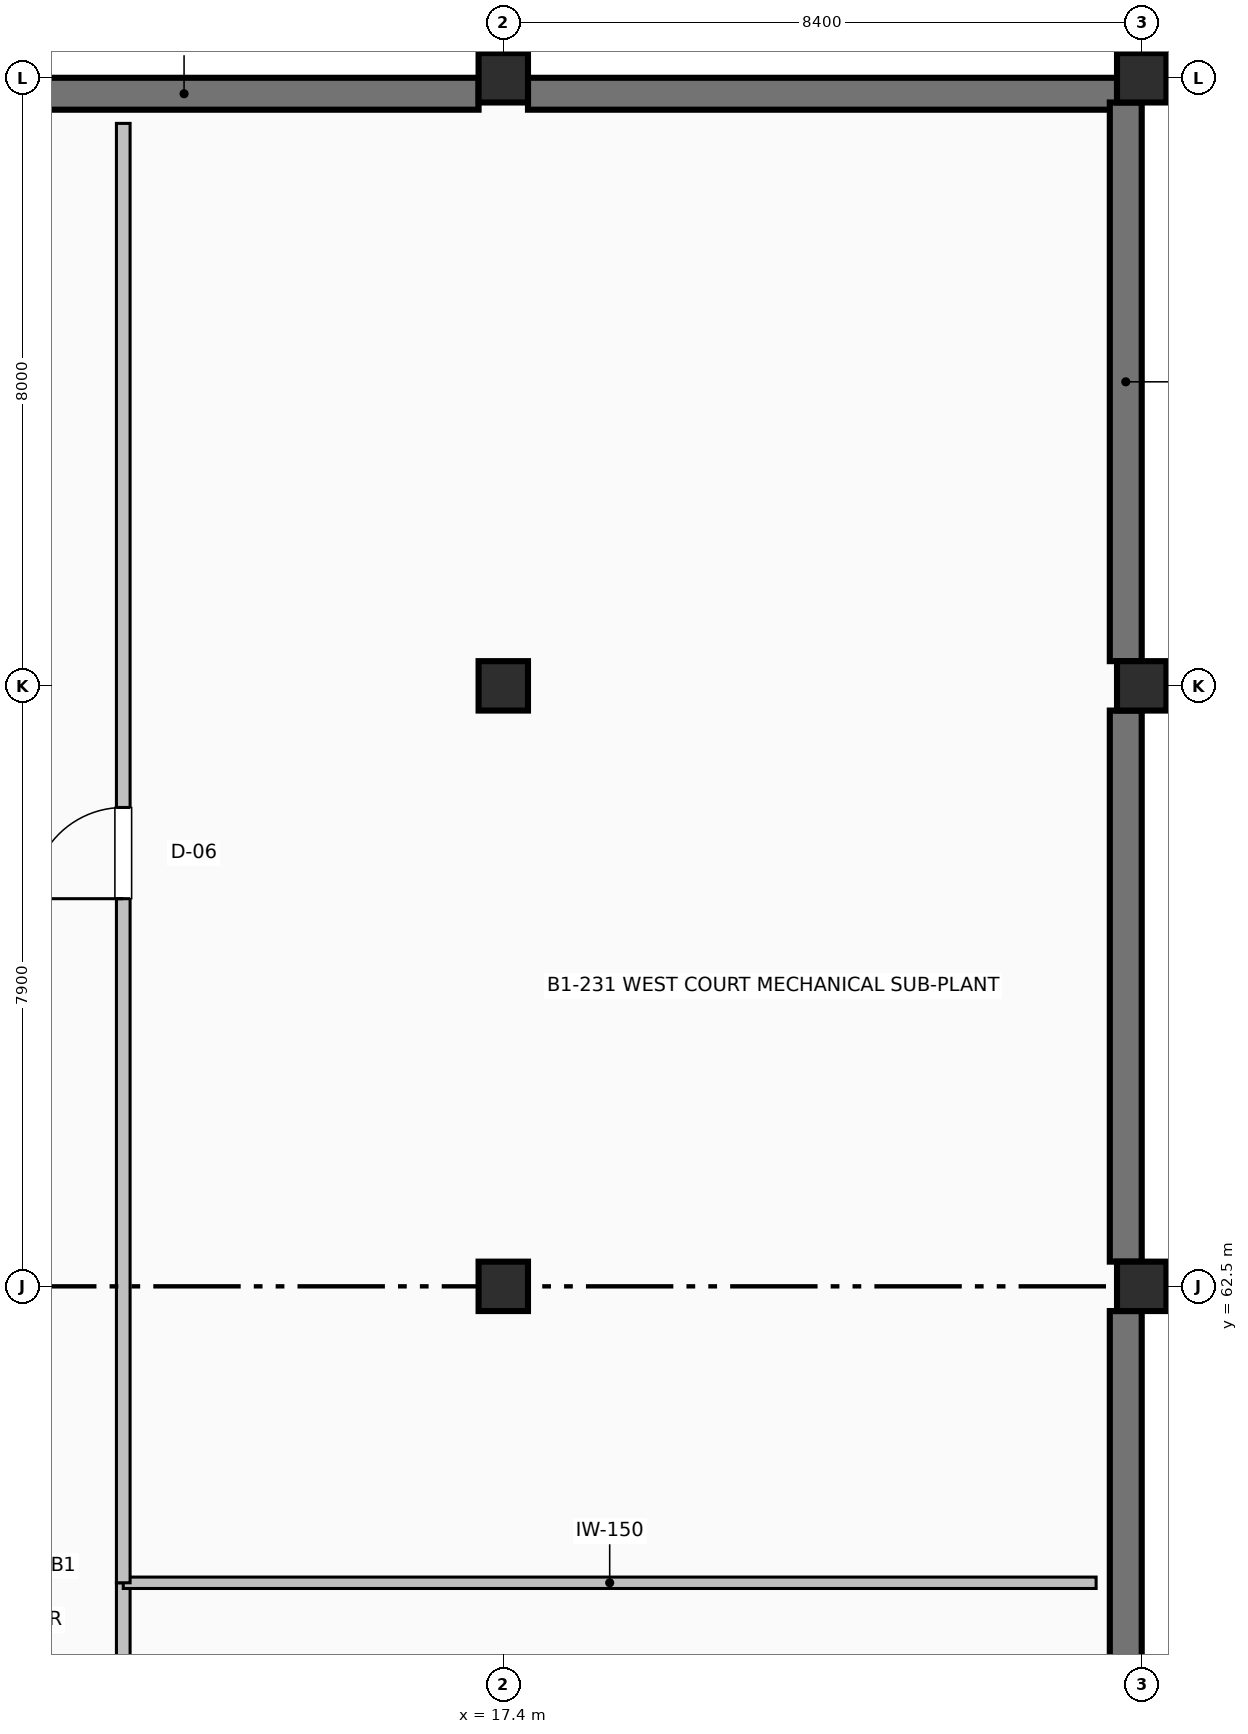
"""IFC4 building model, lengths in metres.
Left out: names, types, materials, properties, quantities, classifications, styles, units other than length and angle.
Written with IfcOpenShell. Run it as: python <this file> out.ifc"""

import sys

from ifc_helpers import new_model, si_unit, direction, frame, frame_2d, origin, origin_2d, place, context, subcontext, project, spatial, rectangle, extrude, element, fill, save


model = new_model("IFC4")
c1 = context("Model", 3, precision=1e-05, world=origin(), true_north=direction((0.0, 1.0)))
c2 = subcontext(c1, "Body", "Model", "MODEL_VIEW")
j1 = project(units=[si_unit("LENGTHUNIT", "METRE"), si_unit("PLANEANGLEUNIT", "RADIAN")], contexts=[c1])
p1 = place(None, origin())
s1 = spatial("IfcSite", under=j1, at=p1, CompositionType="ELEMENT")
p2 = place(p1, origin())
s2 = spatial("IfcBuilding", under=s1, at=p2, CompositionType="ELEMENT")
p3 = place(p2, frame((0.0, 0.0, -4.8)))
s3 = spatial("IfcBuildingStorey", under=s2, at=p3, CompositionType="ELEMENT", Elevation=-4.8)
for number, where, z_axis, x_axis in (
    (1, (17.4, 62.5, 0.0), (0.0, 0.0, 1.0), (1.0, 0.0, 0.0)),
    (2, (17.4, 70.4, 0.0), (0.0, 0.0, 1.0), (1.0, 0.0, 0.0)),
    (3, (17.4, 78.4, 0.0), (0.0, 0.0, 1.0), (1.0, 0.0, 0.0)),
    (4, (25.8, 62.5, 0.0), (0.0, 0.0, 1.0), (1.0, 0.0, 0.0)),
    (5, (25.8, 70.4, 0.0), (0.0, 0.0, 1.0), (1.0, 0.0, 0.0)),
    (6, (25.8, 78.4, 0.0), (0.0, 0.0, 1.0), (1.0, 0.0, 0.0)),
):
    element("IfcColumn", number, at=place(p3, frame(where, z_axis=z_axis, x_axis=x_axis)), inside=s3, PredefinedType="COLUMN", context=c2, shape_type="SweptSolid", body=[
        extrude(rectangle(XDim=0.65, YDim=0.65, at=origin_2d()), origin(), (0.0, 0.0, 1.0), 4.8),
    ])
for number, where, z_axis, x_axis in (
    (7, (9.325, 78.19, 0.0), (0.0, 0.0, 1.0), (1.0, 0.0, 0.0)),
    (8, (17.725, 78.19, 0.0), (0.0, 0.0, 1.0), (1.0, 0.0, 0.0)),
):
    element("IfcWall", number, at=place(p3, frame(where, z_axis=z_axis, x_axis=x_axis)), inside=s3, PredefinedType="SHEAR", context=c2, shape_type="SweptSolid", body=[
        extrude(rectangle(XDim=7.75, YDim=0.42, at=frame_2d((3.875, 0.0))), origin(), (0.0, 0.0, 1.0), 4.5),
    ])
p4 = place(p3, frame((25.59, 78.075, 0.0), z_axis=(0.0, 0.0, 1.0), x_axis=(0.0, -1.0, 0.0)))
e9 = element("IfcWall", 9, at=p4, inside=s3, PredefinedType="SHEAR", context=c2, shape_type="SweptSolid", body=[
    extrude(rectangle(XDim=7.35, YDim=0.42, at=frame_2d((3.675, 0.0))), origin(), (0.0, 0.0, 1.0), 4.5),
])
for number, where, z_axis, x_axis in (
    (10, (25.59, 70.075, 0.0), (0.0, 0.0, 1.0), (0.0, -1.0, 0.0)),
    (11, (25.59, 62.175, 0.0), (0.0, 0.0, 1.0), (0.0, -1.0, 0.0)),
):
    element("IfcWall", number, at=place(p3, frame(where, z_axis=z_axis, x_axis=x_axis)), inside=s3, PredefinedType="SHEAR", context=c2, shape_type="SweptSolid", body=[
        extrude(rectangle(XDim=7.25, YDim=0.42, at=frame_2d((3.625, 0.0))), origin(), (0.0, 0.0, 1.0), 4.5),
    ])
p5 = place(p3, frame((12.4, 39.4, 0.0), z_axis=(0.0, 0.0, 1.0), x_axis=(0.0, 1.0, 0.0)))
e12 = element("IfcWall", 12, at=p5, inside=s3, PredefinedType="PARTITIONING", context=c2, shape_type="SweptSolid", body=[
    extrude(rectangle(XDim=19.2, YDim=0.18, at=frame_2d((9.6, 0.0))), origin(), (0.0, 0.0, 1.0), 4.492),
])
p6 = place(p5, frame((8.925, 0.0, 0.0)))
e13 = element("IfcOpeningElement", 13, at=p6, cuts=e12, PredefinedType="OPENING", context=c2, shape_type="SweptSolid", body=[
    extrude(rectangle(XDim=1.35, YDim=2.16, at=frame_2d((0.675, 1.08))), frame((0.0, 0.1, 0.0), z_axis=(0.0, -1.0, 0.0), x_axis=(1.0, 0.0, 0.0)), (0.0, 0.0, 1.0), 0.2),
])
p7 = place(p3, frame((12.4, 58.6, 0.0), z_axis=(0.0, 0.0, 1.0), x_axis=(1.0, 0.0, 0.0)))
e14 = element("IfcWall", 14, at=p7, inside=s3, PredefinedType="PARTITIONING", context=c2, shape_type="SweptSolid", body=[
    extrude(rectangle(XDim=12.8, YDim=0.15, at=frame_2d((6.4, 0.0))), origin(), (0.0, 0.0, 1.0), 3.892),
])
p8 = place(p3, frame((12.4, 58.6, 0.0), z_axis=(0.0, 0.0, 1.0), x_axis=(0.0, 1.0, 0.0)))
e15 = element("IfcWall", 15, at=p8, inside=s3, PredefinedType="PARTITIONING", context=c2, shape_type="SweptSolid", body=[
    extrude(rectangle(XDim=19.2, YDim=0.18, at=frame_2d((9.6, 0.0))), origin(), (0.0, 0.0, 1.0), 4.492),
])
p9 = place(p8, frame((9.0, 0.0, 0.0)))
e16 = element("IfcOpeningElement", 16, at=p9, cuts=e15, PredefinedType="OPENING", context=c2, shape_type="SweptSolid", body=[
    extrude(rectangle(XDim=1.2, YDim=2.1, at=frame_2d((0.6, 1.05))), frame((0.0, 0.1, 0.0), z_axis=(0.0, -1.0, 0.0), x_axis=(1.0, 0.0, 0.0)), (0.0, 0.0, 1.0), 0.2),
])
p10 = place(p9, origin())
e17 = element("IfcDoor", 17, at=p10, inside=s3, OperationType="SINGLE_SWING_LEFT", PredefinedType="DOOR", context=c2, shape_type="SweptSolid", body=[
    extrude(rectangle(XDim=1.2, YDim=2.1, at=frame_2d((0.6, 1.05))), frame((0.0, 0.025, 0.0), z_axis=(0.0, -1.0, 0.0), x_axis=(1.0, 0.0, 0.0)), (0.0, 0.0, 1.0), 0.05),
])
fill(e16, e17)
save(model, sys.argv[1])
